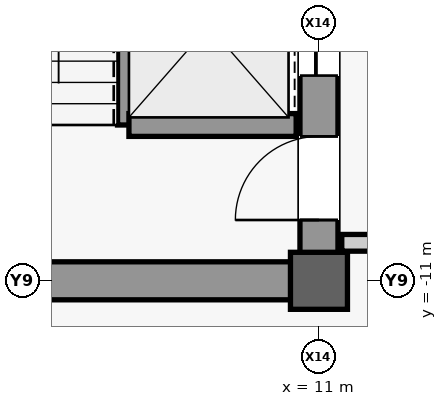
"""IFC4 building model, lengths in metres.
Left out: names, types, materials, properties, quantities, classifications, styles, units other than length and angle.
Written with IfcOpenShell. Run it as: python <this file> out.ifc"""

import sys

from ifc_helpers import new_model, si_unit, direction, frame, frame_2d, origin, origin_2d, place, context, subcontext, project, spatial, rectangle, extrude, source, transform, mapped, element, fill, save


model = new_model("IFC4")
c1 = context("Model", 3, precision=1e-05, world=origin(), true_north=direction((0.0, 1.0)))
c2 = subcontext(c1, "Body", "Model", "MODEL_VIEW")
j1 = project(units=[si_unit("LENGTHUNIT", "METRE"), si_unit("PLANEANGLEUNIT", "RADIAN")], contexts=[c1])
p1 = place(None, origin())
s1 = spatial("IfcSite", under=j1, at=p1, CompositionType="ELEMENT")
p2 = place(p1, origin())
s2 = spatial("IfcBuilding", under=s1, at=p2, CompositionType="ELEMENT")
p3 = place(p2, frame((0.0, 0.0, 389.9)))
s3 = spatial("IfcBuildingStorey", under=s2, at=p3, CompositionType="ELEMENT", Elevation=389.9)
m1 = source(origin(), c2, "Body", "SweptSolid", [
    extrude(rectangle(XDim=22.0, YDim=0.5, at=frame_2d((11.0, 0.0))), origin(), (0.0, 0.0, 1.0), 4.45),
])
p4 = place(p3, frame((11.0, -11.0, 0.0), z_axis=(0.0, 0.0, 1.0), x_axis=(0.0, 1.0, 0.0)))
e1 = element("IfcWall", 1, at=p4, inside=s3, PredefinedType="SHEAR", context=c2, shape_type="MappedRepresentation", body=[
    mapped(m1, transform((0.0, 0.0, 0.0), scale=1.0)),
])
m2 = source(origin(), c2, "Body", "SweptSolid", [
    extrude(rectangle(XDim=1.1, YDim=2.2, at=frame_2d((0.55, 1.1))), frame((0.0, 0.26, 0.0), z_axis=(0.0, -1.0, 0.0), x_axis=(1.0, 0.0, 0.0)), (0.0, 0.0, 1.0), 0.52),
])
p5 = place(p4, frame((0.8, 0.0, 0.0)))
e2 = element("IfcOpeningElement", 2, at=p5, cuts=e1, PredefinedType="OPENING", context=c2, shape_type="MappedRepresentation", body=[
    mapped(m2, transform((0.0, 0.0, 0.0), scale=1.0)),
])
m3 = source(origin(), c2, "Body", "SweptSolid", [
    extrude(rectangle(XDim=0.9, YDim=2.15, at=frame_2d((0.45, 1.075))), frame((0.0, 0.26, 0.0), z_axis=(0.0, -1.0, 0.0), x_axis=(1.0, 0.0, 0.0)), (0.0, 0.0, 1.0), 0.52),
])
p6 = place(p4, frame((7.575, 0.0, 0.0)))
e3 = element("IfcOpeningElement", 3, at=p6, cuts=e1, PredefinedType="OPENING", context=c2, shape_type="MappedRepresentation", body=[
    mapped(m3, transform((0.0, 0.0, 0.0), scale=1.0)),
])
m4 = source(origin(), c2, "Body", "SweptSolid", [
    extrude(rectangle(XDim=1.3, YDim=2.3, at=frame_2d((0.65, 1.15))), frame((0.0, 0.26, 0.0), z_axis=(0.0, -1.0, 0.0), x_axis=(1.0, 0.0, 0.0)), (0.0, 0.0, 1.0), 0.52),
])
p7 = place(p4, frame((2.7, 0.0, 0.0)))
e4 = element("IfcOpeningElement", 4, at=p7, cuts=e1, PredefinedType="OPENING", context=c2, shape_type="MappedRepresentation", body=[
    mapped(m4, transform((0.0, 0.0, 0.0), scale=1.0)),
])
p8 = place(p4, frame((13.35, 0.0, 0.0)))
e5 = element("IfcOpeningElement", 5, at=p8, cuts=e1, PredefinedType="OPENING", context=c2, shape_type="MappedRepresentation", body=[
    mapped(m4, transform((0.0, 0.0, 0.0), scale=1.0)),
])
m5 = source(origin(), c2, "Body", "SweptSolid", [
    extrude(rectangle(XDim=5.9, YDim=0.5, at=frame_2d((2.95, 0.0))), origin(), (0.0, 0.0, 1.0), 4.45),
])
p9 = place(p3, frame((4.85, -11.0, 0.0), z_axis=(0.0, 0.0, 1.0), x_axis=(1.0, 0.0, 0.0)))
e6 = element("IfcWall", 6, at=p9, inside=s3, PredefinedType="SHEAR", context=c2, shape_type="MappedRepresentation", body=[
    mapped(m5, transform((0.0, 0.0, 0.0), scale=1.0)),
])
m6 = source(origin(), c2, "Body", "SweptSolid", [
    extrude(rectangle(XDim=0.75, YDim=0.75, at=origin_2d()), origin(), (0.0, 0.0, 1.0), 4.8),
])
p10 = place(p3, frame((11.0, -11.0, 0.0), z_axis=(0.0, 0.0, 1.0), x_axis=(1.0, 0.0, 0.0)))
e7 = element("IfcColumn", 7, at=p10, inside=s3, PredefinedType="COLUMN", context=c2, shape_type="MappedRepresentation", body=[
    mapped(m6, transform((0.0, 0.0, 0.0), scale=1.0)),
])
m7 = source(origin(), c2, "Body", "SweptSolid", [
    extrude(rectangle(XDim=7.8, YDim=0.3, at=frame_2d((3.9, 0.0))), origin(), (0.0, 0.0, 1.0), 4.45),
])
p11 = place(p3, frame((8.5, -8.95, 0.0), z_axis=(0.0, 0.0, 1.0), x_axis=(0.0, 1.0, 0.0)))
e8 = element("IfcWall", 8, at=p11, inside=s3, PredefinedType="SHEAR", context=c2, shape_type="MappedRepresentation", body=[
    mapped(m7, transform((0.0, 0.0, 0.0), scale=1.0)),
])
m8 = source(origin(), c2, "Body", "SweptSolid", [
    extrude(rectangle(XDim=2.2, YDim=0.3, at=frame_2d((1.1, 0.0))), origin(), (0.0, 0.0, 1.0), 4.45),
])
p12 = place(p3, frame((8.5, -8.95, 0.0), z_axis=(0.0, 0.0, 1.0), x_axis=(1.0, 0.0, 0.0)))
e9 = element("IfcWall", 9, at=p12, inside=s3, PredefinedType="SHEAR", context=c2, shape_type="MappedRepresentation", body=[
    mapped(m8, transform((0.0, 0.0, 0.0), scale=1.0)),
])
m9 = source(origin(), c2, "Body", "SweptSolid", [
    extrude(rectangle(XDim=4.05, YDim=0.22, at=frame_2d((2.025, 0.0))), origin(), (0.0, 0.0, 1.0), 4.45),
])
p13 = place(p3, frame((11.3, -10.5, 0.0), z_axis=(0.0, 0.0, 1.0), x_axis=(1.0, 0.0, 0.0)))
e10 = element("IfcWall", 10, at=p13, inside=s3, PredefinedType="PARTITIONING", context=c2, shape_type="MappedRepresentation", body=[
    mapped(m9, transform((0.0, 0.0, 0.0), scale=1.0)),
])
m10 = source(origin(), c2, "Body", "SweptSolid", [
    extrude(rectangle(XDim=1.1, YDim=2.2, at=frame_2d((0.55, 1.1))), frame((0.0, 0.025, 0.0), z_axis=(0.0, -1.0, 0.0), x_axis=(1.0, 0.0, 0.0)), (0.0, 0.0, 1.0), 0.05),
])
p14 = place(p5, origin())
e11 = element("IfcDoor", 11, at=p14, inside=s3, OperationType="SINGLE_SWING_LEFT", PredefinedType="DOOR", context=c2, shape_type="MappedRepresentation", body=[
    mapped(m10, transform((0.0, 0.0, 0.0), scale=1.0)),
])
fill(e2, e11)
m11 = source(origin(), c2, "Body", "SweptSolid", [
    extrude(rectangle(XDim=1.3, YDim=2.3, at=frame_2d((0.65, 1.15))), frame((0.0, 0.025, 0.0), z_axis=(0.0, -1.0, 0.0), x_axis=(1.0, 0.0, 0.0)), (0.0, 0.0, 1.0), 0.05),
])
p15 = place(p7, origin())
e12 = element("IfcDoor", 12, at=p15, inside=s3, OperationType="SLIDING_TO_LEFT", PredefinedType="DOOR", context=c2, shape_type="MappedRepresentation", body=[
    mapped(m11, transform((0.0, 0.0, 0.0), scale=1.0)),
])
fill(e4, e12)
save(model, sys.argv[1])
